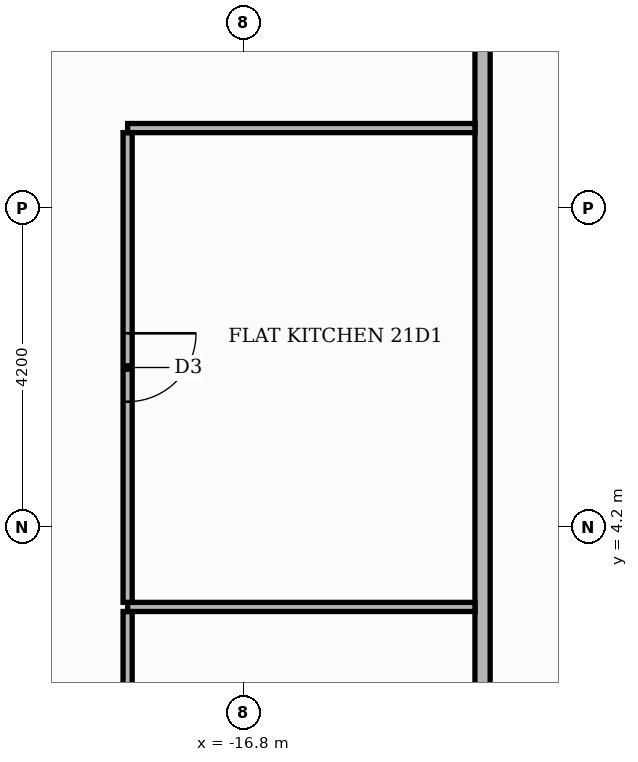
"""IFC4 building model, lengths in metres.
Left out: names, types, materials, properties, quantities, classifications, styles, units other than length and angle.
Written with IfcOpenShell. Run it as: python <this file> out.ifc"""

import sys

from ifc_helpers import new_model, si_unit, direction, frame, frame_2d, origin, place, context, subcontext, project, spatial, rectangle, extrude, element, fill, save


model = new_model("IFC4")
c1 = context("Model", 3, precision=1e-05, world=origin(), true_north=direction((0.0, 1.0)))
c2 = subcontext(c1, "Body", "Model", "MODEL_VIEW")
j1 = project(units=[si_unit("LENGTHUNIT", "METRE"), si_unit("PLANEANGLEUNIT", "RADIAN")], contexts=[c1])
p1 = place(None, origin())
s1 = spatial("IfcSite", under=j1, at=p1, CompositionType="ELEMENT")
p2 = place(p1, origin())
s2 = spatial("IfcBuilding", under=s1, at=p2, CompositionType="ELEMENT")
p3 = place(p2, frame((0.0, 0.0, 90.9)))
s3 = spatial("IfcBuildingStorey", under=s2, at=p3, CompositionType="ELEMENT", Elevation=90.9)
p4 = place(p3, frame((-13.65, -13.55, 0.0), z_axis=(0.0, 0.0, 1.0), x_axis=(0.0, 1.0, 0.0)))
e1 = element("IfcWall", 1, at=p4, inside=s3, PredefinedType="PARTITIONING", context=c2, shape_type="SweptSolid", body=[
    extrude(rectangle(XDim=27.1, YDim=0.2, at=frame_2d((13.55, 0.0))), origin(), (0.0, 0.0, 1.0), 3.48),
])
p5 = place(p4, frame((24.55, 0.0, 0.0)))
e2 = element("IfcOpeningElement", 2, at=p5, cuts=e1, PredefinedType="OPENING", context=c2, shape_type="SweptSolid", body=[
    extrude(rectangle(XDim=1.1, YDim=2.4, at=frame_2d((0.55, 1.2))), frame((0.0, 0.11, 0.0), z_axis=(0.0, -1.0, 0.0), x_axis=(1.0, 0.0, 0.0)), (0.0, 0.0, 1.0), 0.22),
])
p6 = place(p3, frame((-18.32, -0.99, 0.0), z_axis=(0.0, 0.0, 1.0), x_axis=(0.0, 1.0, 0.0)))
e3 = element("IfcWall", 3, at=p6, inside=s3, PredefinedType="PARTITIONING", context=c2, shape_type="SweptSolid", body=[
    extrude(rectangle(XDim=4.08, YDim=0.12, at=frame_2d((2.04, 0.0))), origin(), (0.0, 0.0, 1.0), 3.48),
])
p7 = place(p6, frame((1.59, 0.0, 0.0)))
e4 = element("IfcOpeningElement", 4, at=p7, cuts=e3, PredefinedType="OPENING", context=c2, shape_type="SweptSolid", body=[
    extrude(rectangle(XDim=0.9, YDim=2.1, at=frame_2d((0.45, 1.05))), frame((0.0, 0.07, 0.0), z_axis=(0.0, -1.0, 0.0), x_axis=(1.0, 0.0, 0.0)), (0.0, 0.0, 1.0), 0.14),
])
p8 = place(p3, frame((-18.32, 3.15, 0.0), z_axis=(0.0, 0.0, 1.0), x_axis=(1.0, 0.0, 0.0)))
e5 = element("IfcWall", 5, at=p8, inside=s3, PredefinedType="PARTITIONING", context=c2, shape_type="SweptSolid", body=[
    extrude(rectangle(XDim=4.57, YDim=0.12, at=frame_2d((2.285, 0.0))), origin(), (0.0, 0.0, 1.0), 3.48),
])
p9 = place(p3, frame((-18.32, 3.21, 0.0), z_axis=(0.0, 0.0, 1.0), x_axis=(0.0, 1.0, 0.0)))
e6 = element("IfcWall", 6, at=p9, inside=s3, PredefinedType="PARTITIONING", context=c2, shape_type="SweptSolid", body=[
    extrude(rectangle(XDim=6.18, YDim=0.12, at=frame_2d((3.09, 0.0))), origin(), (0.0, 0.0, 1.0), 3.48),
])
p10 = place(p9, frame((2.64, 0.0, 0.0)))
e7 = element("IfcOpeningElement", 7, at=p10, cuts=e6, PredefinedType="OPENING", context=c2, shape_type="SweptSolid", body=[
    extrude(rectangle(XDim=0.9, YDim=2.1, at=frame_2d((0.45, 1.05))), frame((0.0, 0.07, 0.0), z_axis=(0.0, -1.0, 0.0), x_axis=(1.0, 0.0, 0.0)), (0.0, 0.0, 1.0), 0.14),
])
p11 = place(p3, frame((-18.32, 9.45, 0.0), z_axis=(0.0, 0.0, 1.0), x_axis=(1.0, 0.0, 0.0)))
e8 = element("IfcWall", 8, at=p11, inside=s3, PredefinedType="PARTITIONING", context=c2, shape_type="SweptSolid", body=[
    extrude(rectangle(XDim=4.57, YDim=0.12, at=frame_2d((2.285, 0.0))), origin(), (0.0, 0.0, 1.0), 3.48),
])
p12 = place(p10, frame((0.9, 0.0, 0.0), z_axis=(0.0, 0.0, 1.0), x_axis=(-1.0, 0.0, 0.0)))
e9 = element("IfcDoor", 9, at=p12, inside=s3, OperationType="SINGLE_SWING_RIGHT", PredefinedType="DOOR", context=c2, shape_type="SweptSolid", body=[
    extrude(rectangle(XDim=0.9, YDim=2.1, at=frame_2d((0.45, 1.05))), frame((0.0, 0.025, 0.0), z_axis=(0.0, -1.0, 0.0), x_axis=(1.0, 0.0, 0.0)), (0.0, 0.0, 1.0), 0.05),
])
fill(e7, e9)
save(model, sys.argv[1])
